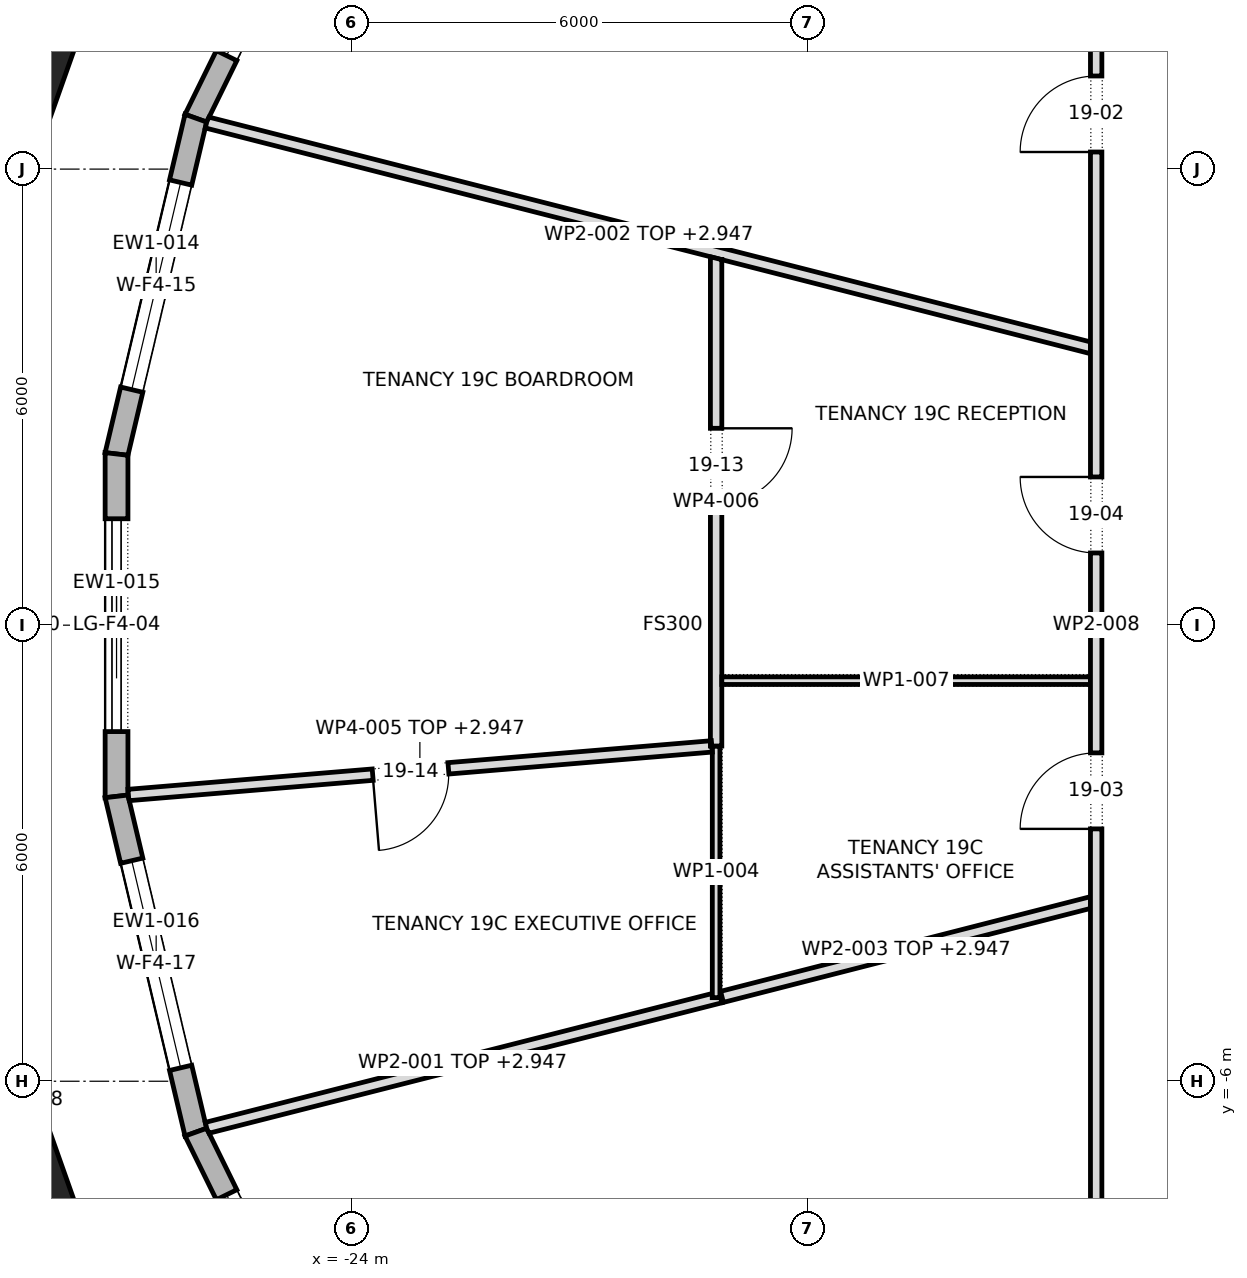
"""IFC4 building model, lengths in metres.
Left out: names, types, materials, properties, quantities, classifications, styles, units other than length and angle.
Written with IfcOpenShell. Run it as: python <this file> out.ifc"""

import sys

from ifc_helpers import new_model, si_unit, direction, frame, frame_2d, origin, origin_2d, place, context, subcontext, project, spatial, polyline, rectangle, outline, extrude, element, fill, save


model = new_model("IFC4")
c1 = context("Model", 3, precision=1e-05, world=origin(), true_north=direction((0.0, 1.0)))
c2 = subcontext(c1, "Body", "Model", "MODEL_VIEW")
j1 = project(units=[si_unit("LENGTHUNIT", "METRE"), si_unit("PLANEANGLEUNIT", "RADIAN")], contexts=[c1])
p1 = place(None, origin())
s1 = spatial("IfcSite", under=j1, at=p1, CompositionType="ELEMENT")
p2 = place(p1, origin())
s2 = spatial("IfcBuilding", under=s1, at=p2, CompositionType="ELEMENT")
p3 = place(p2, frame((0.0, 0.0, 276.3)))
s3 = spatial("IfcBuildingStorey", under=s2, at=p3, CompositionType="ELEMENT", Elevation=276.3)
for number, where, z_axis, x_axis in (
    (1, (-28.255, 7.347, 0.0), (0.0, 0.0, 1.0), (-0.334, -0.943, 0.0)),
    (2, (-28.255, -7.347, 0.0), (0.0, 0.0, 1.0), (0.334, -0.943, 0.0)),
):
    element("IfcColumn", number, at=place(p3, frame(where, z_axis=z_axis, x_axis=x_axis)), inside=s3, PredefinedType="COLUMN", context=c2, shape_type="SweptSolid", body=[
        extrude(rectangle(XDim=1.1, YDim=1.0, at=origin_2d()), origin(), (0.0, 0.0, 1.0), 4.0),
    ])
p4 = place(p3, frame((-24.0, 10.829, 0.0), z_axis=(0.0, 0.0, 1.0), x_axis=(-0.441261940724, -0.897378348117, 0.0)))
e3 = element("IfcWall", 3, at=p4, inside=s3, PredefinedType="STANDARD", context=c2, shape_type="SweptSolid", body=[
    extrude(outline(polyline([(-0.016, -0.15), (4.652, -0.15), (4.618, 0.15), (0.016, 0.15), (-0.016, -0.15)])), origin(), (0.0, 0.0, 1.0), 3.7),
])
p5 = place(p4, frame((0.917, 0.0, 0.6)))
e4 = element("IfcOpeningElement", 4, at=p5, cuts=e3, PredefinedType="OPENING", context=c2, shape_type="SweptSolid", body=[
    extrude(rectangle(XDim=2.8, YDim=2.65, at=frame_2d((1.4, 1.325))), frame((0.0, 0.162, 0.0), z_axis=(0.0, -1.0, 0.0), x_axis=(1.0, 0.0, 0.0)), (0.0, 0.0, 1.0), 0.324),
])
p6 = place(p3, frame((-26.045, 6.67, 0.0), z_axis=(0.0, 0.0, 1.0), x_axis=(-0.22983372436, -0.973229910734, 0.0)))
e5 = element("IfcWall", 5, at=p6, inside=s3, PredefinedType="STANDARD", context=c2, shape_type="SweptSolid", body=[
    extrude(outline(polyline([(-0.017, -0.15), (4.557, -0.15), (4.521, 0.15), (0.017, 0.15), (-0.017, -0.15)])), origin(), (0.0, 0.0, 1.0), 3.7),
])
p7 = place(p6, frame((0.869, 0.0, 0.6)))
e6 = element("IfcOpeningElement", 6, at=p7, cuts=e5, PredefinedType="OPENING", context=c2, shape_type="SweptSolid", body=[
    extrude(rectangle(XDim=2.8, YDim=2.65, at=frame_2d((1.4, 1.325))), frame((0.0, 0.162, 0.0), z_axis=(0.0, -1.0, 0.0), x_axis=(1.0, 0.0, 0.0)), (0.0, 0.0, 1.0), 0.324),
])
p8 = place(p3, frame((-27.088, 2.252, 0.0), z_axis=(0.0, 0.0, 1.0), x_axis=(0.0, -1.0, 0.0)))
e7 = element("IfcWall", 7, at=p8, inside=s3, PredefinedType="STANDARD", context=c2, shape_type="SweptSolid", body=[
    extrude(outline(polyline([(-0.018, -0.15), (4.522, -0.15), (4.487, 0.15), (0.018, 0.15), (-0.018, -0.15)])), origin(), (0.0, 0.0, 1.0), 3.7),
])
p9 = place(p8, frame((0.852, 0.0, 0.0)))
e8 = element("IfcOpeningElement", 8, at=p9, cuts=e7, PredefinedType="OPENING", context=c2, shape_type="SweptSolid", body=[
    extrude(rectangle(XDim=2.8, YDim=3.25, at=frame_2d((1.4, 1.625))), frame((0.0, 0.162, 0.0), z_axis=(0.0, -1.0, 0.0), x_axis=(1.0, 0.0, 0.0)), (0.0, 0.0, 1.0), 0.324),
])
p10 = place(p3, frame((-27.088, -2.252, 0.0), z_axis=(0.0, 0.0, 1.0), x_axis=(0.22983372436, -0.973229910734, 0.0)))
e9 = element("IfcWall", 9, at=p10, inside=s3, PredefinedType="STANDARD", context=c2, shape_type="SweptSolid", body=[
    extrude(outline(polyline([(-0.018, -0.15), (4.556, -0.15), (4.522, 0.15), (0.018, 0.15), (-0.018, -0.15)])), origin(), (0.0, 0.0, 1.0), 3.7),
])
p11 = place(p10, frame((0.869, 0.0, 0.6)))
e10 = element("IfcOpeningElement", 10, at=p11, cuts=e9, PredefinedType="OPENING", context=c2, shape_type="SweptSolid", body=[
    extrude(rectangle(XDim=2.8, YDim=2.65, at=frame_2d((1.4, 1.325))), frame((0.0, 0.162, 0.0), z_axis=(0.0, -1.0, 0.0), x_axis=(1.0, 0.0, 0.0)), (0.0, 0.0, 1.0), 0.324),
])
p12 = place(p3, frame((-26.045, -6.67, 0.0), z_axis=(0.0, 0.0, 1.0), x_axis=(0.441261940724, -0.897378348117, 0.0)))
e11 = element("IfcWall", 11, at=p12, inside=s3, PredefinedType="STANDARD", context=c2, shape_type="SweptSolid", body=[
    extrude(outline(polyline([(-0.017, -0.15), (4.651, -0.15), (4.619, 0.15), (0.017, 0.15), (-0.017, -0.15)])), origin(), (0.0, 0.0, 1.0), 3.7),
])
p13 = place(p12, frame((0.917, 0.0, 0.6)))
e12 = element("IfcOpeningElement", 12, at=p13, cuts=e11, PredefinedType="OPENING", context=c2, shape_type="SweptSolid", body=[
    extrude(rectangle(XDim=2.8, YDim=2.65, at=frame_2d((1.4, 1.325))), frame((0.0, 0.162, 0.0), z_axis=(0.0, -1.0, 0.0), x_axis=(1.0, 0.0, 0.0)), (0.0, 0.0, 1.0), 0.324),
])
p14 = place(p3, frame((-25.902, -6.614, 0.0), z_axis=(0.0, 0.0, 1.0), x_axis=(0.969153959709, 0.246456086108, 0.0)))
e13 = element("IfcWall", 13, at=p14, inside=s3, PredefinedType="PARTITIONING", context=c2, shape_type="SweptSolid", body=[
    extrude(outline(polyline([(0.013, -0.075), (1.756, -0.075), (3.5, -0.075), (5.243, -0.075), (6.986, -0.075), (6.986, 0.072), (6.967, -0.003), (6.87, 0.022), (6.883, 0.075), (5.162, 0.075), (3.442, 0.075), (1.721, 0.075), (0.0, 0.075), (0.0, -0.012), (0.013, -0.075)])), origin(), (0.0, 0.0, 1.0), 2.947),
])
p15 = place(p3, frame((-25.902, 6.614, 0.0), z_axis=(0.0, 0.0, 1.0), x_axis=(0.968990601513, -0.247097580277, 0.0)))
e14 = element("IfcWall", 14, at=p15, inside=s3, PredefinedType="PARTITIONING", context=c2, shape_type="SweptSolid", body=[
    extrude(outline(polyline([(0.0, -0.075), (1.752, -0.075), (3.504, -0.075), (5.256, -0.075), (7.008, -0.075), (7.013, -0.074), (7.013, -0.075), (8.682, -0.075), (10.35, -0.075), (12.019, -0.075), (11.98, 0.075), (9.986, 0.075), (7.991, 0.075), (5.997, 0.075), (4.002, 0.075), (2.008, 0.075), (0.013, 0.075), (0.0, 0.012), (0.0, -0.075)])), origin(), (0.0, 0.0, 1.0), 2.947),
])
p16 = place(p3, frame((-19.132, -4.893, 0.0), z_axis=(0.0, 0.0, 1.0), x_axis=(0.968763144659, 0.247987841537, 0.0)))
e15 = element("IfcWall", 15, at=p16, inside=s3, PredefinedType="PARTITIONING", context=c2, shape_type="SweptSolid", body=[
    extrude(outline(polyline([(0.0, -0.075), (1.665, -0.075), (3.33, -0.075), (4.994, -0.075), (5.033, 0.074), (5.033, 0.075), (3.355, 0.075), (1.678, 0.075), (0.001, 0.075), (0.0, 0.072), (0.0, -0.075)])), origin(), (0.0, 0.0, 1.0), 2.947),
])
p17 = place(p3, frame((-19.2, -4.9, 0.0), z_axis=(0.0, 0.0, 1.0), x_axis=(0.0, 1.0, 0.0)))
e16 = element("IfcWall", 16, at=p17, inside=s3, PredefinedType="PARTITIONING", context=c2, shape_type="SweptSolid", body=[
    extrude(rectangle(XDim=3.31, YDim=0.1, at=frame_2d((1.655, 0.0))), origin(), (0.0, 0.0, 1.0), 3.7),
])
p18 = place(p3, frame((-19.256, -1.595, 0.0), z_axis=(0.0, 0.0, 1.0), x_axis=(-0.996545321007, -0.083050726542, 0.0)))
e17 = element("IfcWall", 17, at=p18, inside=s3, PredefinedType="PARTITIONING", context=c2, shape_type="SweptSolid", body=[
    extrude(outline(polyline([(7.702, -0.075), (7.702, 0.043), (7.697, 0.075), (5.773, 0.075), (3.849, 0.075), (1.924, 0.075), (0.0, 0.075), (0.0, -0.005), (0.018, -0.006), (0.012, -0.075), (1.935, -0.075), (3.857, -0.075), (5.78, -0.075), (7.702, -0.075)])), origin(), (0.0, 0.0, 1.0), 2.947),
])
p19 = place(p18, frame((3.477, 0.0, 0.0)))
e18 = element("IfcOpeningElement", 18, at=p19, cuts=e17, PredefinedType="OPENING", context=c2, shape_type="SweptSolid", body=[
    extrude(rectangle(XDim=1.0, YDim=2.1, at=frame_2d((0.5, 1.05))), frame((0.0, 0.087, 0.0), z_axis=(0.0, -1.0, 0.0), x_axis=(1.0, 0.0, 0.0)), (0.0, 0.0, 1.0), 0.174),
])
p20 = place(p3, frame((-19.2, -1.59, 0.0), z_axis=(0.0, 0.0, 1.0), x_axis=(0.0, 1.0, 0.0)))
e19 = element("IfcWall", 19, at=p20, inside=s3, PredefinedType="PARTITIONING", context=c2, shape_type="SweptSolid", body=[
    extrude(outline(polyline([(0.0, -0.075), (0.81, -0.075), (0.91, -0.075), (2.74, -0.075), (4.569, -0.075), (6.399, -0.075), (6.437, 0.074), (6.437, 0.075), (4.845, 0.075), (3.253, 0.075), (1.661, 0.075), (0.069, 0.075), (0.07, 0.062), (0.0, 0.057), (0.0, 0.05), (0.0, 0.05), (0.0, -0.05), (0.0, -0.05), (0.0, -0.075)])), origin(), (0.0, 0.0, 1.0), 3.7),
])
p21 = place(p20, frame((3.18, 0.0, 0.0)))
e20 = element("IfcOpeningElement", 20, at=p21, cuts=e19, PredefinedType="OPENING", context=c2, shape_type="SweptSolid", body=[
    extrude(rectangle(XDim=1.0, YDim=2.1, at=frame_2d((0.5, 1.05))), frame((0.0, 0.087, 0.0), z_axis=(0.0, -1.0, 0.0), x_axis=(1.0, 0.0, 0.0)), (0.0, 0.0, 1.0), 0.174),
])
p22 = place(p3, frame((-19.125, -0.73, 0.0), z_axis=(0.0, 0.0, 1.0), x_axis=(1.0, 0.0, 0.0)))
e21 = element("IfcWall", 21, at=p22, inside=s3, PredefinedType="PARTITIONING", context=c2, shape_type="SweptSolid", body=[
    extrude(rectangle(XDim=4.85, YDim=0.1, at=frame_2d((2.425, 0.0))), origin(), (0.0, 0.0, 1.0), 3.7),
])
p23 = place(p3, frame((-14.2, -14.275, 0.0), z_axis=(0.0, 0.0, 1.0), x_axis=(0.0, 1.0, 0.0)))
e22 = element("IfcWall", 22, at=p23, inside=s3, PredefinedType="PARTITIONING", context=c2, shape_type="SweptSolid", body=[
    extrude(outline(polyline([(0.15, -0.075), (2.033, -0.075), (3.917, -0.075), (5.8, -0.075), (7.683, -0.075), (9.567, -0.075), (11.45, -0.075), (13.333, -0.075), (15.217, -0.075), (17.1, -0.075), (18.983, -0.075), (20.866, -0.075), (22.75, -0.075), (24.633, -0.075), (26.517, -0.075), (28.4, -0.075), (28.55, 0.075), (28.55, 0.075), (26.646, 0.075), (24.743, 0.075), (22.84, 0.075), (20.937, 0.075), (19.033, 0.075), (17.13, 0.075), (15.227, 0.075), (13.323, 0.075), (11.42, 0.075), (9.517, 0.075), (7.613, 0.075), (5.71, 0.075), (3.807, 0.075), (1.903, 0.075), (0.0, 0.075), (0.15, -0.075)])), origin(), (0.0, 0.0, 1.0), 3.7),
])
p24 = place(p23, frame((20.5, 0.0, 0.0)))
e23 = element("IfcOpeningElement", 23, at=p24, cuts=e22, PredefinedType="OPENING", context=c2, shape_type="SweptSolid", body=[
    extrude(rectangle(XDim=1.0, YDim=2.1, at=frame_2d((0.5, 1.05))), frame((0.0, 0.087, 0.0), z_axis=(0.0, -1.0, 0.0), x_axis=(1.0, 0.0, 0.0)), (0.0, 0.0, 1.0), 0.174),
])
p25 = place(p23, frame((11.595, 0.0, 0.0)))
e24 = element("IfcOpeningElement", 24, at=p25, cuts=e22, PredefinedType="OPENING", context=c2, shape_type="SweptSolid", body=[
    extrude(rectangle(XDim=1.0, YDim=2.1, at=frame_2d((0.5, 1.05))), frame((0.0, 0.087, 0.0), z_axis=(0.0, -1.0, 0.0), x_axis=(1.0, 0.0, 0.0)), (0.0, 0.0, 1.0), 0.174),
])
p26 = place(p23, frame((15.225, 0.0, 0.0)))
e25 = element("IfcOpeningElement", 25, at=p26, cuts=e22, PredefinedType="OPENING", context=c2, shape_type="SweptSolid", body=[
    extrude(rectangle(XDim=1.0, YDim=2.1, at=frame_2d((0.5, 1.05))), frame((0.0, 0.087, 0.0), z_axis=(0.0, -1.0, 0.0), x_axis=(1.0, 0.0, 0.0)), (0.0, 0.0, 1.0), 0.174),
])
p27 = place(p23, frame((4.86, 0.0, 0.0)))
e26 = element("IfcOpeningElement", 26, at=p27, cuts=e22, PredefinedType="OPENING", context=c2, shape_type="SweptSolid", body=[
    extrude(rectangle(XDim=1.0, YDim=2.1, at=frame_2d((0.5, 1.05))), frame((0.0, 0.087, 0.0), z_axis=(0.0, -1.0, 0.0), x_axis=(1.0, 0.0, 0.0)), (0.0, 0.0, 1.0), 0.174),
])
p28 = place(p5, origin())
e27 = element("IfcWindow", 27, at=p28, inside=s3, PartitioningType="DOUBLE_PANEL_VERTICAL", PredefinedType="WINDOW", context=c2, shape_type="SweptSolid", body=[
    extrude(rectangle(XDim=2.8, YDim=2.65, at=frame_2d((1.4, 1.325))), frame((0.0, 0.03, 0.0), z_axis=(0.0, -1.0, 0.0), x_axis=(1.0, 0.0, 0.0)), (0.0, 0.0, 1.0), 0.06),
])
fill(e4, e27)
p29 = place(p7, origin())
e28 = element("IfcWindow", 28, at=p29, inside=s3, PartitioningType="DOUBLE_PANEL_VERTICAL", PredefinedType="WINDOW", context=c2, shape_type="SweptSolid", body=[
    extrude(rectangle(XDim=2.8, YDim=2.65, at=frame_2d((1.4, 1.325))), frame((0.0, 0.03, 0.0), z_axis=(0.0, -1.0, 0.0), x_axis=(1.0, 0.0, 0.0)), (0.0, 0.0, 1.0), 0.06),
])
fill(e6, e28)
p30 = place(p9, origin())
e29 = element("IfcDoor", 29, at=p30, inside=s3, OperationType="DOUBLE_DOOR_SLIDING", PredefinedType="DOOR", context=c2, shape_type="SweptSolid", body=[
    extrude(rectangle(XDim=2.8, YDim=3.25, at=frame_2d((1.4, 1.625))), frame((0.0, 0.025, 0.0), z_axis=(0.0, -1.0, 0.0), x_axis=(1.0, 0.0, 0.0)), (0.0, 0.0, 1.0), 0.05),
])
fill(e8, e29)
p31 = place(p11, origin())
e30 = element("IfcWindow", 30, at=p31, inside=s3, PartitioningType="DOUBLE_PANEL_VERTICAL", PredefinedType="WINDOW", context=c2, shape_type="SweptSolid", body=[
    extrude(rectangle(XDim=2.8, YDim=2.65, at=frame_2d((1.4, 1.325))), frame((0.0, 0.03, 0.0), z_axis=(0.0, -1.0, 0.0), x_axis=(1.0, 0.0, 0.0)), (0.0, 0.0, 1.0), 0.06),
])
fill(e10, e30)
p32 = place(p13, origin())
e31 = element("IfcWindow", 31, at=p32, inside=s3, PartitioningType="DOUBLE_PANEL_VERTICAL", PredefinedType="WINDOW", context=c2, shape_type="SweptSolid", body=[
    extrude(rectangle(XDim=2.8, YDim=2.65, at=frame_2d((1.4, 1.325))), frame((0.0, 0.03, 0.0), z_axis=(0.0, -1.0, 0.0), x_axis=(1.0, 0.0, 0.0)), (0.0, 0.0, 1.0), 0.06),
])
fill(e12, e31)
p33 = place(p24, origin())
e32 = element("IfcDoor", 32, at=p33, inside=s3, OperationType="SINGLE_SWING_RIGHT", PredefinedType="DOOR", context=c2, shape_type="SweptSolid", body=[
    extrude(rectangle(XDim=1.0, YDim=2.1, at=frame_2d((0.5, 1.05))), frame((0.0, 0.025, 0.0), z_axis=(0.0, -1.0, 0.0), x_axis=(1.0, 0.0, 0.0)), (0.0, 0.0, 1.0), 0.05),
])
fill(e23, e32)
p34 = place(p25, origin())
e33 = element("IfcDoor", 33, at=p34, inside=s3, OperationType="SINGLE_SWING_RIGHT", PredefinedType="DOOR", context=c2, shape_type="SweptSolid", body=[
    extrude(rectangle(XDim=1.0, YDim=2.1, at=frame_2d((0.5, 1.05))), frame((0.0, 0.025, 0.0), z_axis=(0.0, -1.0, 0.0), x_axis=(1.0, 0.0, 0.0)), (0.0, 0.0, 1.0), 0.05),
])
fill(e24, e33)
p35 = place(p26, origin())
e34 = element("IfcDoor", 34, at=p35, inside=s3, OperationType="SINGLE_SWING_LEFT", PredefinedType="DOOR", context=c2, shape_type="SweptSolid", body=[
    extrude(rectangle(XDim=1.0, YDim=2.1, at=frame_2d((0.5, 1.05))), frame((0.0, 0.025, 0.0), z_axis=(0.0, -1.0, 0.0), x_axis=(1.0, 0.0, 0.0)), (0.0, 0.0, 1.0), 0.05),
])
fill(e25, e34)
p36 = place(p21, frame((1.0, 0.0, 0.0), z_axis=(0.0, 0.0, 1.0), x_axis=(-1.0, 0.0, 0.0)))
e35 = element("IfcDoor", 35, at=p36, inside=s3, OperationType="SINGLE_SWING_RIGHT", PredefinedType="DOOR", context=c2, shape_type="SweptSolid", body=[
    extrude(rectangle(XDim=1.0, YDim=2.1, at=frame_2d((0.5, 1.05))), frame((0.0, 0.025, 0.0), z_axis=(0.0, -1.0, 0.0), x_axis=(1.0, 0.0, 0.0)), (0.0, 0.0, 1.0), 0.05),
])
fill(e20, e35)
p37 = place(p19, origin())
e36 = element("IfcDoor", 36, at=p37, inside=s3, OperationType="SINGLE_SWING_LEFT", PredefinedType="DOOR", context=c2, shape_type="SweptSolid", body=[
    extrude(rectangle(XDim=1.0, YDim=2.1, at=frame_2d((0.5, 1.05))), frame((0.0, 0.025, 0.0), z_axis=(0.0, -1.0, 0.0), x_axis=(1.0, 0.0, 0.0)), (0.0, 0.0, 1.0), 0.05),
])
fill(e18, e36)
save(model, sys.argv[1])
